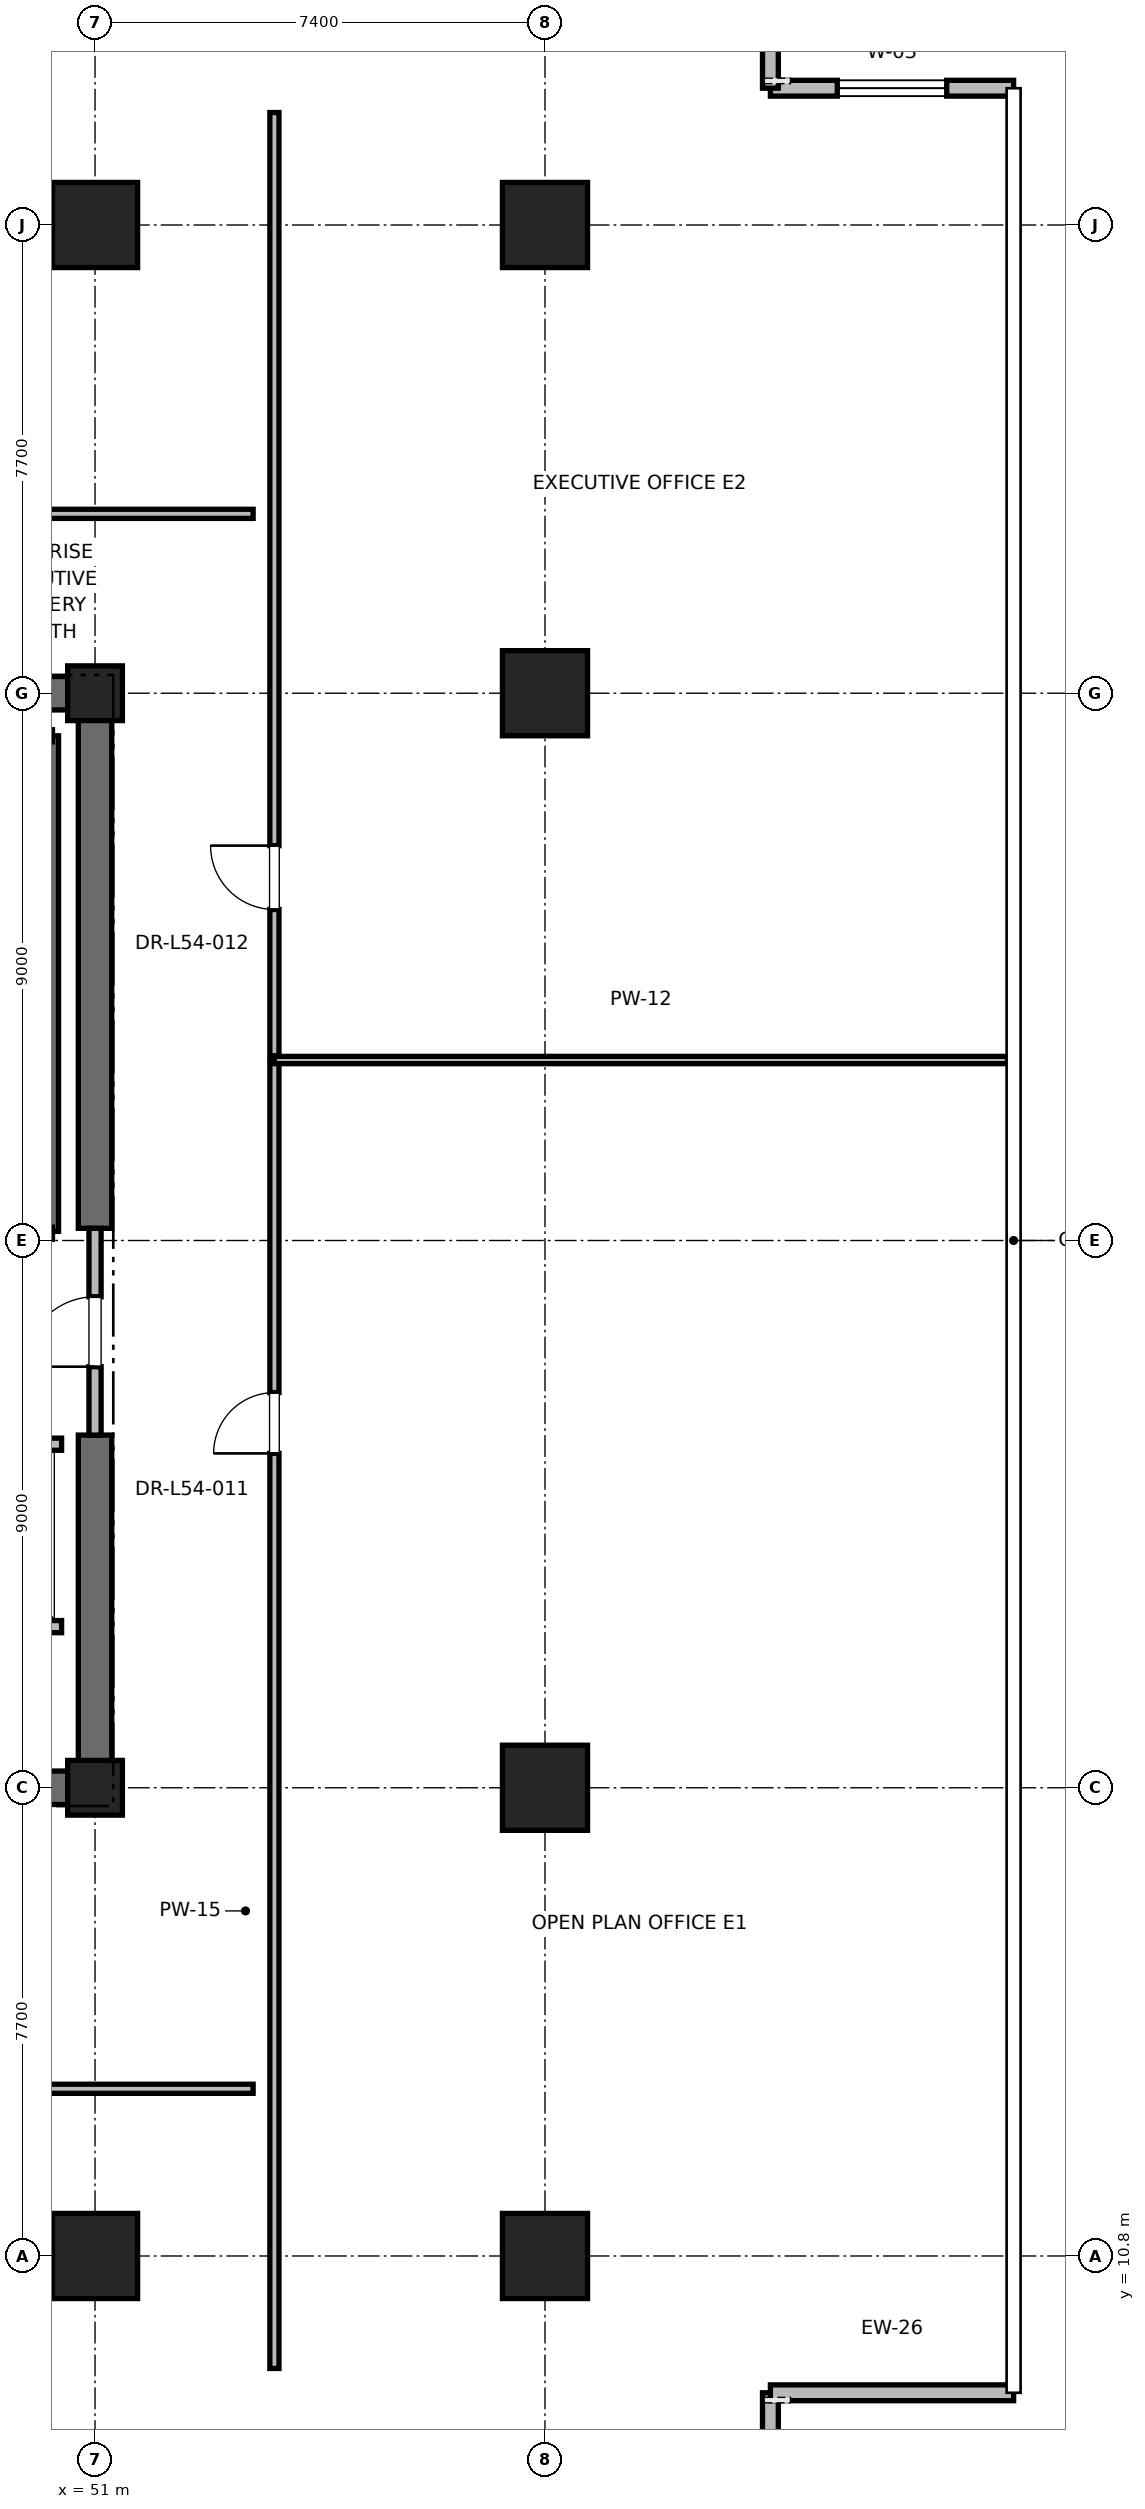
"""IFC4 building model, lengths in metres.
Left out: names, types, materials, properties, quantities, classifications, styles, units other than length and angle.
Written with IfcOpenShell. Run it as: python <this file> out.ifc"""

import sys

from ifc_helpers import new_model, si_unit, direction, frame, frame_2d, origin, origin_2d, place, context, subcontext, project, spatial, rectangle, extrude, element, fill, save


model = new_model("IFC4")
c1 = context("Model", 3, precision=1e-05, world=origin(), true_north=direction((0.0, 1.0)))
c2 = subcontext(c1, "Body", "Model", "MODEL_VIEW")
j1 = project(units=[si_unit("LENGTHUNIT", "METRE"), si_unit("PLANEANGLEUNIT", "RADIAN")], contexts=[c1])
p1 = place(None, origin())
s1 = spatial("IfcSite", under=j1, at=p1, CompositionType="ELEMENT")
p2 = place(p1, origin())
s2 = spatial("IfcBuilding", under=s1, at=p2, CompositionType="ELEMENT")
p3 = place(p2, frame((0.0, 0.0, 233.2)))
s3 = spatial("IfcBuildingStorey", under=s2, at=p3, CompositionType="ELEMENT", Elevation=233.2)
for number, where, z_axis, x_axis in (
    (1, (51.0, 10.8, 0.0), (0.0, 0.0, 1.0), (1.0, 0.0, 0.0)),
    (2, (51.0, 44.2, 0.0), (0.0, 0.0, 1.0), (1.0, 0.0, 0.0)),
    (3, (58.4, 18.5, 0.0), (0.0, 0.0, 1.0), (1.0, 0.0, 0.0)),
    (4, (58.4, 36.5, 0.0), (0.0, 0.0, 1.0), (1.0, 0.0, 0.0)),
    (5, (58.4, 10.8, 0.0), (0.0, 0.0, 1.0), (1.0, 0.0, 0.0)),
    (6, (58.4, 44.2, 0.0), (0.0, 0.0, 1.0), (1.0, 0.0, 0.0)),
):
    element("IfcColumn", number, at=place(p3, frame(where, z_axis=z_axis, x_axis=x_axis)), inside=s3, PredefinedType="COLUMN", context=c2, shape_type="SweptSolid", body=[
        extrude(rectangle(XDim=1.4, YDim=1.4, at=origin_2d()), origin(), (0.0, 0.0, 1.0), 5.0),
    ])
for number, where, z_axis, x_axis in (
    (7, (51.0, 18.5, 0.0), (0.0, 0.0, 1.0), (1.0, 0.0, 0.0)),
    (8, (51.0, 36.5, 0.0), (0.0, 0.0, 1.0), (1.0, 0.0, 0.0)),
):
    element("IfcColumn", number, at=place(p3, frame(where, z_axis=z_axis, x_axis=x_axis)), inside=s3, PredefinedType="PILASTER", context=c2, shape_type="SweptSolid", body=[
        extrude(rectangle(XDim=0.9, YDim=0.9, at=origin_2d()), origin(), (0.0, 0.0, 1.0), 5.0),
    ])
p4 = place(p3, frame((41.8, 18.5, 0.0), z_axis=(0.0, 0.0, 1.0), x_axis=(1.0, 0.0, 0.0)))
e9 = element("IfcWall", 9, at=p4, inside=s3, PredefinedType="SHEAR", context=c2, shape_type="SweptSolid", body=[
    extrude(rectangle(XDim=9.2, YDim=0.55, at=frame_2d((4.6, 0.0))), origin(), (0.0, 0.0, 1.0), 4.7),
])
for number, where, z_axis, x_axis in (
    (10, (45.2, 36.5, 0.0), (0.0, 0.0, 1.0), (1.0, 0.0, 0.0)),
    (11, (51.0, 18.5, 0.0), (0.0, 0.0, 1.0), (0.0, 1.0, 0.0)),
):
    element("IfcWall", number, at=place(p3, frame(where, z_axis=z_axis, x_axis=x_axis)), inside=s3, PredefinedType="SHEAR", context=c2, shape_type="SweptSolid", body=[
        extrude(rectangle(XDim=5.8, YDim=0.55, at=frame_2d((2.9, 0.0))), origin(), (0.0, 0.0, 1.0), 4.7),
    ])
p5 = place(p3, frame((51.0, 27.7, 0.0), z_axis=(0.0, 0.0, 1.0), x_axis=(0.0, 1.0, 0.0)))
e12 = element("IfcWall", 12, at=p5, inside=s3, PredefinedType="SHEAR", context=c2, shape_type="SweptSolid", body=[
    extrude(rectangle(XDim=8.8, YDim=0.55, at=frame_2d((4.4, 0.0))), origin(), (0.0, 0.0, 1.0), 4.7),
])
p6 = place(p3, frame((62.107, 5.05, 0.0), z_axis=(0.0, 0.0, 1.0), x_axis=(0.0, 1.0, 0.0)))
e13 = element("IfcWall", 13, at=p6, inside=s3, PredefinedType="PARAPET", context=c2, shape_type="SweptSolid", body=[
    extrude(rectangle(XDim=3.5, YDim=0.26, at=frame_2d((1.75, 0.0))), origin(), (0.0, 0.0, 1.0), 4.7),
])
p7 = place(p6, frame((0.85, 0.0, 0.85)))
e14 = element("IfcOpeningElement", 14, at=p7, cuts=e13, PredefinedType="OPENING", context=c2, shape_type="SweptSolid", body=[
    extrude(rectangle(XDim=1.8, YDim=2.2, at=frame_2d((0.9, 1.1))), frame((0.0, 0.13, 0.0), z_axis=(0.0, -1.0, 0.0), x_axis=(1.0, 0.0, 0.0)), (0.0, 0.0, 1.0), 0.26),
])
p8 = place(p3, frame((62.107, 8.55, 0.0), z_axis=(0.0, 0.0, 1.0), x_axis=(1.0, 0.0, 0.0)))
e15 = element("IfcWall", 15, at=p8, inside=s3, PredefinedType="PARAPET", context=c2, shape_type="SweptSolid", body=[
    extrude(rectangle(XDim=4.0, YDim=0.26, at=frame_2d((2.0, 0.0))), origin(), (0.0, 0.0, 1.0), 4.7),
])
p9 = place(p3, frame((66.107, 46.45, 0.0), z_axis=(0.0, 0.0, 1.0), x_axis=(-1.0, 0.0, 0.0)))
e16 = element("IfcWall", 16, at=p9, inside=s3, PredefinedType="PARAPET", context=c2, shape_type="SweptSolid", body=[
    extrude(rectangle(XDim=4.0, YDim=0.26, at=frame_2d((2.0, 0.0))), origin(), (0.0, 0.0, 1.0), 4.7),
])
p10 = place(p9, frame((1.1, 0.0, 0.85)))
e17 = element("IfcOpeningElement", 17, at=p10, cuts=e16, PredefinedType="OPENING", context=c2, shape_type="SweptSolid", body=[
    extrude(rectangle(XDim=1.8, YDim=2.2, at=frame_2d((0.9, 1.1))), frame((0.0, 0.13, 0.0), z_axis=(0.0, -1.0, 0.0), x_axis=(1.0, 0.0, 0.0)), (0.0, 0.0, 1.0), 0.26),
])
p11 = place(p3, frame((62.107, 46.45, 0.0), z_axis=(0.0, 0.0, 1.0), x_axis=(0.0, 1.0, 0.0)))
e18 = element("IfcWall", 18, at=p11, inside=s3, PredefinedType="PARAPET", context=c2, shape_type="SweptSolid", body=[
    extrude(rectangle(XDim=3.5, YDim=0.26, at=frame_2d((1.75, 0.0))), origin(), (0.0, 0.0, 1.0), 4.7),
])
p12 = place(p3, frame((50.3, 27.65, 0.0), z_axis=(0.0, 0.0, 1.0), x_axis=(0.0, 1.0, 0.0)))
e19 = element("IfcWall", 19, at=p12, inside=s3, PredefinedType="SOLIDWALL", context=c2, shape_type="SweptSolid", body=[
    extrude(rectangle(XDim=8.15, YDim=0.2, at=frame_2d((4.075, 0.0))), origin(), (0.0, 0.0, 1.0), 4.7),
])
p13 = place(p3, frame((51.0, 24.3, 0.0), z_axis=(0.0, 0.0, 1.0), x_axis=(0.0, 1.0, 0.0)))
e20 = element("IfcWall", 20, at=p13, inside=s3, PredefinedType="PARTITIONING", context=c2, shape_type="SweptSolid", body=[
    extrude(rectangle(XDim=3.4, YDim=0.2, at=frame_2d((1.7, 0.0))), origin(), (0.0, 0.0, 1.0), 3.68),
])
p14 = place(p13, frame((1.125, 0.0, 0.0)))
e21 = element("IfcOpeningElement", 21, at=p14, cuts=e20, PredefinedType="OPENING", context=c2, shape_type="SweptSolid", body=[
    extrude(rectangle(XDim=1.15, YDim=2.2, at=frame_2d((0.575, 1.1))), frame((0.0, 0.1, 0.0), z_axis=(0.0, -1.0, 0.0), x_axis=(1.0, 0.0, 0.0)), (0.0, 0.0, 1.0), 0.2),
])
p15 = place(p3, frame((47.85, 21.15, 0.0), z_axis=(0.0, 0.0, 1.0), x_axis=(1.0, 0.0, 0.0)))
e22 = element("IfcWall", 22, at=p15, inside=s3, PredefinedType="SOLIDWALL", context=c2, shape_type="SweptSolid", body=[
    extrude(rectangle(XDim=2.6, YDim=0.2, at=frame_2d((1.3, 0.0))), origin(), (0.0, 0.0, 1.0), 4.7),
])
p16 = place(p3, frame((50.45, 24.15, 0.0), z_axis=(0.0, 0.0, 1.0), x_axis=(-1.0, 0.0, 0.0)))
e23 = element("IfcWall", 23, at=p16, inside=s3, PredefinedType="SOLIDWALL", context=c2, shape_type="SweptSolid", body=[
    extrude(rectangle(XDim=2.6, YDim=0.2, at=frame_2d((1.3, 0.0))), origin(), (0.0, 0.0, 1.0), 3.68),
])
p17 = place(p16, frame((0.75, 0.0, 0.0)))
e24 = element("IfcOpeningElement", 24, at=p17, cuts=e23, PredefinedType="OPENING", context=c2, shape_type="SweptSolid", body=[
    extrude(rectangle(XDim=1.1, YDim=2.2, at=frame_2d((0.55, 1.1))), frame((0.0, 0.1, 0.0), z_axis=(0.0, -1.0, 0.0), x_axis=(1.0, 0.0, 0.0)), (0.0, 0.0, 1.0), 0.2),
])
p18 = place(p3, frame((41.43, 39.45, 0.0), z_axis=(0.0, 0.0, 1.0), x_axis=(1.0, 0.0, 0.0)))
e25 = element("IfcWall", 25, at=p18, inside=s3, PredefinedType="PARTITIONING", context=c2, shape_type="SweptSolid", body=[
    extrude(rectangle(XDim=12.17, YDim=0.15, at=frame_2d((6.085, 0.0))), origin(), (0.0, 0.0, 1.0), 2.85),
])
p19 = place(p18, frame((5.535, 0.0, 0.0)))
e26 = element("IfcOpeningElement", 26, at=p19, cuts=e25, PredefinedType="OPENING", context=c2, shape_type="SweptSolid", body=[
    extrude(rectangle(XDim=1.0, YDim=2.15, at=frame_2d((0.5, 1.075))), frame((0.0, 0.075, 0.0), z_axis=(0.0, -1.0, 0.0), x_axis=(1.0, 0.0, 0.0)), (0.0, 0.0, 1.0), 0.15),
])
p20 = place(p3, frame((26.4, 13.55, 0.0), z_axis=(0.0, 0.0, 1.0), x_axis=(1.0, 0.0, 0.0)))
e27 = element("IfcWall", 27, at=p20, inside=s3, PredefinedType="PARTITIONING", context=c2, shape_type="SweptSolid", body=[
    extrude(rectangle(XDim=27.2, YDim=0.15, at=frame_2d((13.6, 0.0))), origin(), (0.0, 0.0, 1.0), 2.85),
])
p21 = place(p20, frame((13.1, 0.0, 0.0)))
e28 = element("IfcOpeningElement", 28, at=p21, cuts=e27, PredefinedType="OPENING", context=c2, shape_type="SweptSolid", body=[
    extrude(rectangle(XDim=1.0, YDim=2.15, at=frame_2d((0.5, 1.075))), frame((0.0, 0.075, 0.0), z_axis=(0.0, -1.0, 0.0), x_axis=(1.0, 0.0, 0.0)), (0.0, 0.0, 1.0), 0.15),
])
p22 = place(p3, frame((53.95, 8.95, 0.0), z_axis=(0.0, 0.0, 1.0), x_axis=(0.0, 1.0, 0.0)))
e29 = element("IfcWall", 29, at=p22, inside=s3, PredefinedType="PARTITIONING", context=c2, shape_type="SweptSolid", body=[
    extrude(rectangle(XDim=21.518, YDim=0.15, at=frame_2d((10.759, 0.0))), origin(), (0.0, 0.0, 1.0), 2.85),
])
p23 = place(p22, frame((15.049, 0.0, 0.0)))
e30 = element("IfcOpeningElement", 30, at=p23, cuts=e29, PredefinedType="OPENING", context=c2, shape_type="SweptSolid", body=[
    extrude(rectangle(XDim=1.0, YDim=2.15, at=frame_2d((0.5, 1.075))), frame((0.0, 0.075, 0.0), z_axis=(0.0, -1.0, 0.0), x_axis=(1.0, 0.0, 0.0)), (0.0, 0.0, 1.0), 0.15),
])
p24 = place(p3, frame((53.95, 30.468, 0.0), z_axis=(0.0, 0.0, 1.0), x_axis=(1.0, 0.0, 0.0)))
e31 = element("IfcWall", 31, at=p24, inside=s3, PredefinedType="PARTITIONING", context=c2, shape_type="SweptSolid", body=[
    extrude(rectangle(XDim=12.057, YDim=0.12, at=frame_2d((6.029, 0.0))), origin(), (0.0, 0.0, 1.0), 2.85),
])
p25 = place(p3, frame((53.95, 30.538, 0.0), z_axis=(0.0, 0.0, 1.0), x_axis=(0.0, 1.0, 0.0)))
e32 = element("IfcWall", 32, at=p25, inside=s3, PredefinedType="PARTITIONING", context=c2, shape_type="SweptSolid", body=[
    extrude(rectangle(XDim=15.512, YDim=0.15, at=frame_2d((7.756, 0.0))), origin(), (0.0, 0.0, 1.0), 2.85),
])
p26 = place(p25, frame((2.406, 0.0, 0.0)))
e33 = element("IfcOpeningElement", 33, at=p26, cuts=e32, PredefinedType="OPENING", context=c2, shape_type="SweptSolid", body=[
    extrude(rectangle(XDim=1.05, YDim=2.2, at=frame_2d((0.525, 1.1))), frame((0.0, 0.075, 0.0), z_axis=(0.0, -1.0, 0.0), x_axis=(1.0, 0.0, 0.0)), (0.0, 0.0, 1.0), 0.15),
])
p27 = place(p10, origin())
e34 = element("IfcWindow", 34, at=p27, inside=s3, PartitioningType="SINGLE_PANEL", PredefinedType="WINDOW", context=c2, shape_type="SweptSolid", body=[
    extrude(rectangle(XDim=1.8, YDim=2.2, at=frame_2d((0.9, 1.1))), frame((0.0, 0.03, 0.0), z_axis=(0.0, -1.0, 0.0), x_axis=(1.0, 0.0, 0.0)), (0.0, 0.0, 1.0), 0.06),
])
fill(e17, e34)
p28 = place(p14, origin())
e35 = element("IfcDoor", 35, at=p28, inside=s3, OperationType="SINGLE_SWING_LEFT", PredefinedType="DOOR", context=c2, shape_type="SweptSolid", body=[
    extrude(rectangle(XDim=1.15, YDim=2.2, at=frame_2d((0.575, 1.1))), frame((0.0, 0.025, 0.0), z_axis=(0.0, -1.0, 0.0), x_axis=(1.0, 0.0, 0.0)), (0.0, 0.0, 1.0), 0.05),
])
fill(e21, e35)
p29 = place(p23, origin())
e36 = element("IfcDoor", 36, at=p29, inside=s3, OperationType="SINGLE_SWING_LEFT", PredefinedType="DOOR", context=c2, shape_type="SweptSolid", body=[
    extrude(rectangle(XDim=1.0, YDim=2.15, at=frame_2d((0.5, 1.075))), frame((0.0, 0.025, 0.0), z_axis=(0.0, -1.0, 0.0), x_axis=(1.0, 0.0, 0.0)), (0.0, 0.0, 1.0), 0.05),
])
fill(e30, e36)
p30 = place(p26, origin())
e37 = element("IfcDoor", 37, at=p30, inside=s3, OperationType="SINGLE_SWING_RIGHT", PredefinedType="DOOR", context=c2, shape_type="SweptSolid", body=[
    extrude(rectangle(XDim=1.05, YDim=2.2, at=frame_2d((0.525, 1.1))), frame((0.0, 0.025, 0.0), z_axis=(0.0, -1.0, 0.0), x_axis=(1.0, 0.0, 0.0)), (0.0, 0.0, 1.0), 0.05),
])
fill(e33, e37)
save(model, sys.argv[1])
